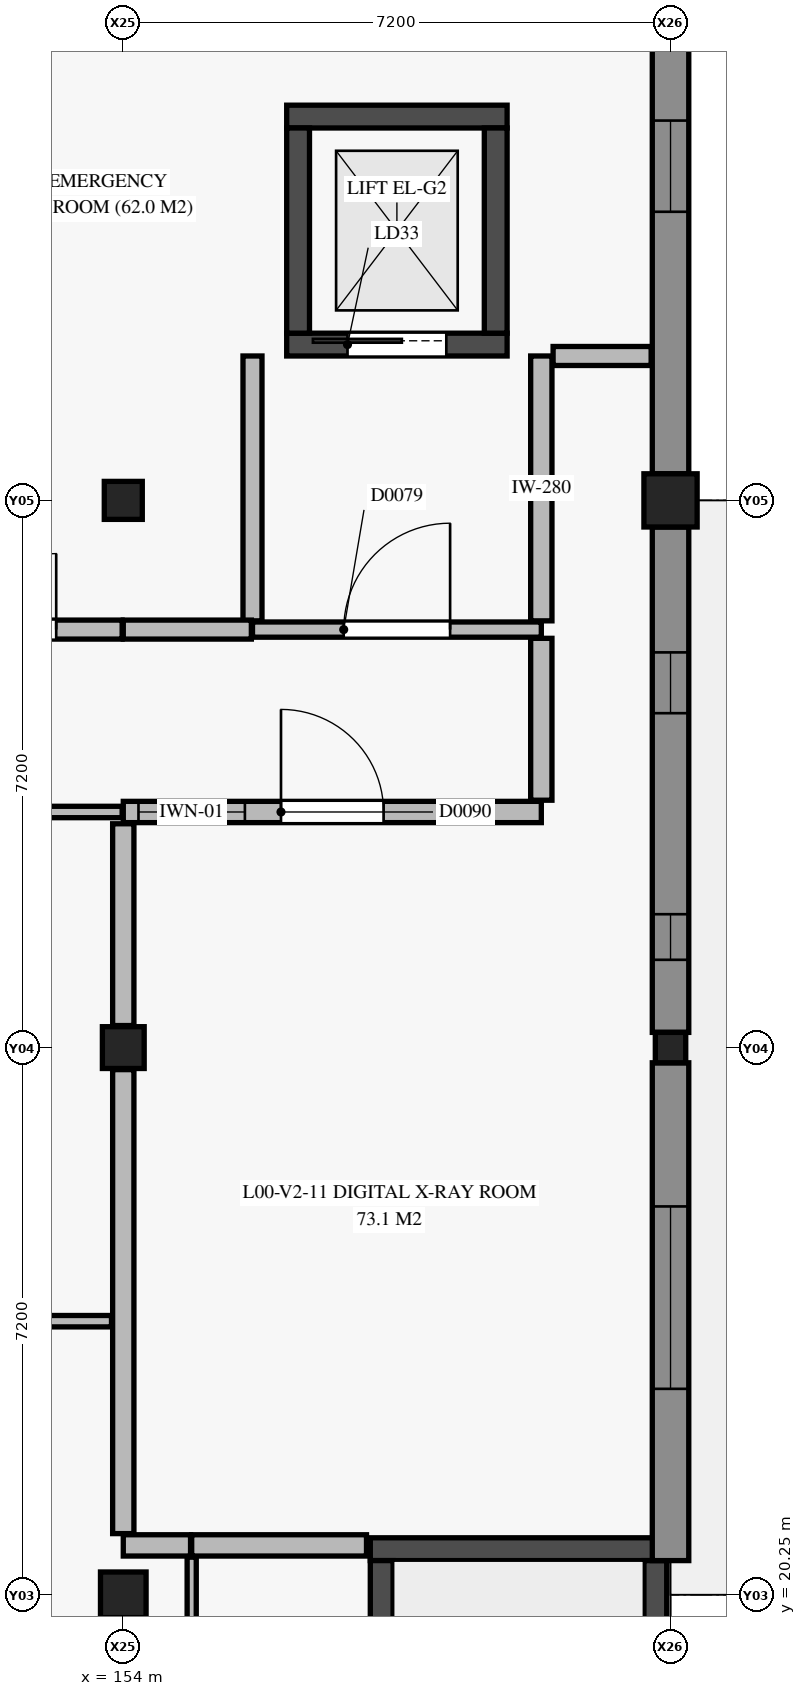
"""IFC4 building model, lengths in metres.
Left out: names, types, materials, properties, quantities, classifications, styles, units other than length and angle.
Written with IfcOpenShell. Run it as: python <this file> out.ifc"""

import sys

from ifc_helpers import new_model, si_unit, direction, frame, frame_2d, origin, origin_2d, place, context, subcontext, project, spatial, rectangle, circle, extrude, element, fill, save


model = new_model("IFC4")
c1 = context("Model", 3, precision=1e-05, world=origin(), true_north=direction((0.0, 1.0)))
c2 = subcontext(c1, "Body", "Model", "MODEL_VIEW")
j1 = project(units=[si_unit("LENGTHUNIT", "METRE"), si_unit("PLANEANGLEUNIT", "RADIAN")], contexts=[c1])
p1 = place(None, origin())
s1 = spatial("IfcSite", under=j1, at=p1, CompositionType="ELEMENT")
p2 = place(p1, origin())
s2 = spatial("IfcBuilding", under=s1, at=p2, CompositionType="ELEMENT")
p3 = place(p2, origin())
s3 = spatial("IfcBuildingStorey", under=s2, at=p3, CompositionType="ELEMENT", Elevation=0.0)
p4 = place(p3, frame((154.0, 20.25, 0.0), z_axis=(0.0, 0.0, 1.0), x_axis=(1.0, 0.0, 0.0)))
e1 = element("IfcColumn", 1, at=p4, inside=s3, PredefinedType="COLUMN", context=c2, shape_type="SweptSolid", body=[
    extrude(rectangle(XDim=0.6, YDim=0.6, at=origin_2d()), origin(), (0.0, 0.0, 1.0), 4.8),
])
p5 = place(p3, frame((154.0, 27.45, 0.0), z_axis=(0.0, 0.0, 1.0), x_axis=(1.0, 0.0, 0.0)))
e2 = element("IfcColumn", 2, at=p5, inside=s3, PredefinedType="COLUMN", context=c2, shape_type="SweptSolid", body=[
    extrude(rectangle(XDim=0.55, YDim=0.55, at=origin_2d()), origin(), (0.0, 0.0, 1.0), 4.8),
])
p6 = place(p3, frame((154.0, 34.65, 0.0), z_axis=(0.0, 0.0, 1.0), x_axis=(1.0, 0.0, 0.0)))
e3 = element("IfcColumn", 3, at=p6, inside=s3, PredefinedType="COLUMN", context=c2, shape_type="SweptSolid", body=[
    extrude(rectangle(XDim=0.5, YDim=0.5, at=origin_2d()), origin(), (0.0, 0.0, 1.0), 4.8),
])
p7 = place(p3, frame((161.2, 27.45, 0.0), z_axis=(0.0, 0.0, 1.0), x_axis=(1.0, 0.0, 0.0)))
e4 = element("IfcColumn", 4, at=p7, inside=s3, PredefinedType="COLUMN", context=c2, shape_type="SweptSolid", body=[
    extrude(rectangle(XDim=0.4, YDim=0.4, at=origin_2d()), origin(), (0.0, 0.0, 1.0), 4.8),
])
p8 = place(p3, frame((161.2, 34.65, 0.0), z_axis=(0.0, 0.0, 1.0), x_axis=(1.0, 0.0, 0.0)))
e5 = element("IfcColumn", 5, at=p8, inside=s3, PredefinedType="COLUMN", context=c2, shape_type="SweptSolid", body=[
    extrude(circle(Radius=0.35, at=origin_2d()), origin(), (0.0, 0.0, 1.0), 4.8),
])
p9 = place(p3, frame((157.25, 20.85, 0.0), z_axis=(0.0, 0.0, 1.0), x_axis=(1.0, 0.0, 0.0)))
e6 = element("IfcWall", 6, at=p9, inside=s3, PredefinedType="SHEAR", context=c2, shape_type="SweptSolid", body=[
    extrude(rectangle(XDim=3.9, YDim=0.3, at=frame_2d((1.95, 0.0))), origin(), (0.0, 0.0, 1.0), 4.46),
])
p10 = place(p3, frame((157.4, 13.4, 0.0), z_axis=(0.0, 0.0, 1.0), x_axis=(0.0, 1.0, 0.0)))
e7 = element("IfcWall", 7, at=p10, inside=s3, PredefinedType="SHEAR", context=c2, shape_type="SweptSolid", body=[
    extrude(rectangle(XDim=7.3, YDim=0.3, at=frame_2d((3.65, 0.0))), origin(), (0.0, 0.0, 1.0), 4.46),
])
p11 = place(p10, frame((0.12, 0.0, 0.0)))
e8 = element("IfcOpeningElement", 8, at=p11, cuts=e7, PredefinedType="OPENING", context=c2, shape_type="SweptSolid", body=[
    extrude(rectangle(XDim=1.5, YDim=2.15, at=frame_2d((0.75, 1.075))), frame((0.0, 0.16, 0.0), z_axis=(0.0, -1.0, 0.0), x_axis=(1.0, 0.0, 0.0)), (0.0, 0.0, 1.0), 0.32),
])
p12 = place(p3, frame((161.0, 13.45, 0.0), z_axis=(0.0, 0.0, 1.0), x_axis=(0.0, 1.0, 0.0)))
e9 = element("IfcWall", 9, at=p12, inside=s3, PredefinedType="SHEAR", context=c2, shape_type="SweptSolid", body=[
    extrude(rectangle(XDim=7.25, YDim=0.3, at=frame_2d((3.625, 0.0))), origin(), (0.0, 0.0, 1.0), 4.46),
])
p13 = place(p3, frame((156.15, 36.7, 0.0), z_axis=(0.0, 0.0, 1.0), x_axis=(1.0, 0.0, 0.0)))
e10 = element("IfcWall", 10, at=p13, inside=s3, PredefinedType="SHEAR", context=c2, shape_type="SweptSolid", body=[
    extrude(rectangle(XDim=2.9, YDim=0.3, at=frame_2d((1.45, 0.0))), origin(), (0.0, 0.0, 1.0), 4.46),
])
p14 = place(p13, frame((0.8, 0.0, 0.0)))
e11 = element("IfcOpeningElement", 11, at=p14, cuts=e10, PredefinedType="OPENING", context=c2, shape_type="SweptSolid", body=[
    extrude(rectangle(XDim=1.3, YDim=2.15, at=frame_2d((0.65, 1.075))), frame((0.0, 0.16, 0.0), z_axis=(0.0, -1.0, 0.0), x_axis=(1.0, 0.0, 0.0)), (0.0, 0.0, 1.0), 0.32),
])
p15 = place(p3, frame((156.15, 39.7, 0.0), z_axis=(0.0, 0.0, 1.0), x_axis=(1.0, 0.0, 0.0)))
e12 = element("IfcWall", 12, at=p15, inside=s3, PredefinedType="SHEAR", context=c2, shape_type="SweptSolid", body=[
    extrude(rectangle(XDim=2.9, YDim=0.3, at=frame_2d((1.45, 0.0))), origin(), (0.0, 0.0, 1.0), 4.46),
])
for number, where, z_axis, x_axis in (
    (13, (156.3, 36.85, 0.0), (0.0, 0.0, 1.0), (0.0, 1.0, 0.0)),
    (14, (158.9, 36.85, 0.0), (0.0, 0.0, 1.0), (0.0, 1.0, 0.0)),
):
    element("IfcWall", number, at=place(p3, frame(where, z_axis=z_axis, x_axis=x_axis)), inside=s3, PredefinedType="SHEAR", context=c2, shape_type="SweptSolid", body=[
        extrude(rectangle(XDim=2.7, YDim=0.3, at=frame_2d((1.35, 0.0))), origin(), (0.0, 0.0, 1.0), 4.46),
    ])
p16 = place(p3, frame((161.2, 41.525, 0.0), z_axis=(0.0, 0.0, 1.0), x_axis=(0.0, -1.0, 0.0)))
e15 = element("IfcWall", 15, at=p16, inside=s3, PredefinedType="SOLIDWALL", context=c2, shape_type="SweptSolid", body=[
    extrude(rectangle(XDim=6.525, YDim=0.48, at=frame_2d((3.262, 0.0))), origin(), (0.0, 0.0, 1.0), 3.64),
])
p17 = place(p16, frame((1.877, 0.0, 0.6)))
e16 = element("IfcOpeningElement", 16, at=p17, cuts=e15, PredefinedType="OPENING", context=c2, shape_type="SweptSolid", body=[
    extrude(rectangle(XDim=1.2, YDim=2.2, at=frame_2d((0.6, 1.1))), frame((0.0, 0.25, 0.0), z_axis=(0.0, -1.0, 0.0), x_axis=(1.0, 0.0, 0.0)), (0.0, 0.0, 1.0), 0.5),
])
p18 = place(p3, frame((161.2, 34.3, 0.0), z_axis=(0.0, 0.0, 1.0), x_axis=(0.0, -1.0, 0.0)))
e17 = element("IfcWall", 17, at=p18, inside=s3, PredefinedType="SOLIDWALL", context=c2, shape_type="SweptSolid", body=[
    extrude(rectangle(XDim=6.65, YDim=0.48, at=frame_2d((3.325, 0.0))), origin(), (0.0, 0.0, 1.0), 3.64),
])
p19 = place(p18, frame((1.65, 0.0, 0.6)))
e18 = element("IfcOpeningElement", 18, at=p19, cuts=e17, PredefinedType="OPENING", context=c2, shape_type="SweptSolid", body=[
    extrude(rectangle(XDim=0.8, YDim=2.6, at=frame_2d((0.4, 1.3))), frame((0.0, 0.25, 0.0), z_axis=(0.0, -1.0, 0.0), x_axis=(1.0, 0.0, 0.0)), (0.0, 0.0, 1.0), 0.5),
])
p20 = place(p18, frame((5.095, 0.0, 0.9)))
e19 = element("IfcOpeningElement", 19, at=p20, cuts=e17, PredefinedType="OPENING", context=c2, shape_type="SweptSolid", body=[
    extrude(rectangle(XDim=0.6, YDim=1.8, at=frame_2d((0.3, 0.9))), frame((0.0, 0.25, 0.0), z_axis=(0.0, -1.0, 0.0), x_axis=(1.0, 0.0, 0.0)), (0.0, 0.0, 1.0), 0.5),
])
p21 = place(p3, frame((161.2, 27.25, 0.0), z_axis=(0.0, 0.0, 1.0), x_axis=(0.0, -1.0, 0.0)))
e20 = element("IfcWall", 20, at=p21, inside=s3, PredefinedType="SOLIDWALL", context=c2, shape_type="SweptSolid", body=[
    extrude(rectangle(XDim=6.55, YDim=0.48, at=frame_2d((3.275, 0.0))), origin(), (0.0, 0.0, 1.0), 3.64),
])
p22 = place(p21, frame((1.89, 0.0, 0.6)))
e21 = element("IfcOpeningElement", 21, at=p22, cuts=e20, PredefinedType="OPENING", context=c2, shape_type="SweptSolid", body=[
    extrude(rectangle(XDim=2.4, YDim=2.2, at=frame_2d((1.2, 1.1))), frame((0.0, 0.25, 0.0), z_axis=(0.0, -1.0, 0.0), x_axis=(1.0, 0.0, 0.0)), (0.0, 0.0, 1.0), 0.5),
])
p23 = place(p3, frame((155.7, 32.95, 0.0), z_axis=(0.0, 0.0, 1.0), x_axis=(1.0, 0.0, 0.0)))
e22 = element("IfcWall", 22, at=p23, inside=s3, PredefinedType="PARTITIONING", context=c2, shape_type="SweptSolid", body=[
    extrude(rectangle(XDim=3.8, YDim=0.2, at=frame_2d((1.9, 0.0))), origin(), (0.0, 0.0, 1.0), 4.46),
])
p24 = place(p23, frame((1.2, 0.0, 0.0)))
e23 = element("IfcOpeningElement", 23, at=p24, cuts=e22, PredefinedType="OPENING", context=c2, shape_type="SweptSolid", body=[
    extrude(rectangle(XDim=1.4, YDim=2.2, at=frame_2d((0.7, 1.1))), frame((0.0, 0.11, 0.0), z_axis=(0.0, -1.0, 0.0), x_axis=(1.0, 0.0, 0.0)), (0.0, 0.0, 1.0), 0.22),
])
p25 = place(p3, frame((155.7, 33.065, 0.0), z_axis=(0.0, 0.0, 1.0), x_axis=(0.0, 1.0, 0.0)))
e24 = element("IfcWall", 24, at=p25, inside=s3, PredefinedType="PARTITIONING", context=c2, shape_type="SweptSolid", body=[
    extrude(rectangle(XDim=3.485, YDim=0.25, at=frame_2d((1.743, 0.0))), origin(), (0.0, 0.0, 1.0), 3.965),
])
p26 = place(p3, frame((159.5, 33.065, 0.0), z_axis=(0.0, 0.0, 1.0), x_axis=(0.0, 1.0, 0.0)))
e25 = element("IfcWall", 25, at=p26, inside=s3, PredefinedType="PARTITIONING", context=c2, shape_type="SweptSolid", body=[
    extrude(rectangle(XDim=3.485, YDim=0.28, at=frame_2d((1.743, 0.0))), origin(), (0.0, 0.0, 1.0), 3.965),
])
p27 = place(p3, frame((154.0, 32.95, 0.0), z_axis=(0.0, 0.0, 1.0), x_axis=(1.0, 0.0, 0.0)))
e26 = element("IfcWall", 26, at=p27, inside=s3, PredefinedType="PARTITIONING", context=c2, shape_type="SweptSolid", body=[
    extrude(rectangle(XDim=1.685, YDim=0.25, at=frame_2d((0.843, 0.0))), origin(), (0.0, 0.0, 1.0), 3.795),
])
p28 = place(p3, frame((150.25, 32.95, 0.0), z_axis=(0.0, 0.0, 1.0), x_axis=(1.0, 0.0, 0.0)))
e27 = element("IfcWall", 27, at=p28, inside=s3, PredefinedType="PARTITIONING", context=c2, shape_type="SweptSolid", body=[
    extrude(rectangle(XDim=3.735, YDim=0.25, at=frame_2d((1.868, 0.0))), origin(), (0.0, 0.0, 1.0), 3.795),
])
p29 = place(p28, frame((0.867, 0.0, 0.0)))
e28 = element("IfcOpeningElement", 28, at=p29, cuts=e27, PredefinedType="OPENING", context=c2, shape_type="SweptSolid", body=[
    extrude(rectangle(XDim=2.0, YDim=2.4, at=frame_2d((1.0, 1.2))), frame((0.0, 0.135, 0.0), z_axis=(0.0, -1.0, 0.0), x_axis=(1.0, 0.0, 0.0)), (0.0, 0.0, 1.0), 0.27),
])
p30 = place(p3, frame((154.9, 20.9, 0.0), z_axis=(0.0, 0.0, 1.0), x_axis=(1.0, 0.0, 0.0)))
e29 = element("IfcWall", 29, at=p30, inside=s3, PredefinedType="PARTITIONING", context=c2, shape_type="SweptSolid", body=[
    extrude(rectangle(XDim=2.3, YDim=0.28, at=frame_2d((1.15, 0.0))), origin(), (0.0, 0.0, 1.0), 4.46),
])
p31 = place(p3, frame((154.0, 30.55, 0.0), z_axis=(0.0, 0.0, 1.0), x_axis=(1.0, 0.0, 0.0)))
e30 = element("IfcWall", 30, at=p31, inside=s3, PredefinedType="PARTITIONING", context=c2, shape_type="SweptSolid", body=[
    extrude(rectangle(XDim=5.5, YDim=0.28, at=frame_2d((2.75, 0.0))), origin(), (0.0, 0.0, 1.0), 3.795),
])
p32 = place(p31, frame((2.075, 0.0, 0.0)))
e31 = element("IfcOpeningElement", 31, at=p32, cuts=e30, PredefinedType="OPENING", context=c2, shape_type="SweptSolid", body=[
    extrude(rectangle(XDim=1.35, YDim=2.2, at=frame_2d((0.675, 1.1))), frame((0.0, 0.15, 0.0), z_axis=(0.0, -1.0, 0.0), x_axis=(1.0, 0.0, 0.0)), (0.0, 0.0, 1.0), 0.3),
])
p33 = place(p31, frame((0.2, 0.0, 1.05)))
e32 = element("IfcOpeningElement", 32, at=p33, cuts=e30, PredefinedType="OPENING", context=c2, shape_type="SweptSolid", body=[
    extrude(rectangle(XDim=1.4, YDim=1.1, at=frame_2d((0.7, 0.55))), frame((0.0, 0.15, 0.0), z_axis=(0.0, -1.0, 0.0), x_axis=(1.0, 0.0, 0.0)), (0.0, 0.0, 1.0), 0.3),
])
p34 = place(p3, frame((159.5, 30.705, 0.0), z_axis=(0.0, 0.0, 1.0), x_axis=(0.0, 1.0, 0.0)))
e33 = element("IfcWall", 33, at=p34, inside=s3, PredefinedType="PARTITIONING", context=c2, shape_type="SweptSolid", body=[
    extrude(rectangle(XDim=2.13, YDim=0.28, at=frame_2d((1.065, 0.0))), origin(), (0.0, 0.0, 1.0), 3.985),
])
p35 = place(p3, frame((151.69, 30.55, 0.0), z_axis=(0.0, 0.0, 1.0), x_axis=(1.0, 0.0, 0.0)))
e34 = element("IfcWall", 34, at=p35, inside=s3, PredefinedType="PARTITIONING", context=c2, shape_type="SweptSolid", body=[
    extrude(rectangle(XDim=2.295, YDim=0.15, at=frame_2d((1.147, 0.0))), origin(), (0.0, 0.0, 1.0), 3.795),
])
p36 = place(p3, frame((154.9, 17.85, 0.0), z_axis=(0.0, 0.0, 1.0), x_axis=(0.0, 1.0, 0.0)))
e35 = element("IfcWall", 35, at=p36, inside=s3, PredefinedType="PARTITIONING", context=c2, shape_type="SweptSolid", body=[
    extrude(rectangle(XDim=2.895, YDim=0.12, at=frame_2d((1.448, 0.0))), origin(), (0.0, 0.0, 1.0), 4.46),
])
p37 = place(p3, frame((159.655, 36.55, 0.0), z_axis=(0.0, 0.0, 1.0), x_axis=(1.0, 0.0, 0.0)))
e36 = element("IfcWall", 36, at=p37, inside=s3, PredefinedType="PARTITIONING", context=c2, shape_type="SweptSolid", body=[
    extrude(rectangle(XDim=1.29, YDim=0.25, at=frame_2d((0.645, 0.0))), origin(), (0.0, 0.0, 1.0), 4.46),
])
p38 = place(p3, frame((154.0, 20.9, 0.0), z_axis=(0.0, 0.0, 1.0), x_axis=(1.0, 0.0, 0.0)))
e37 = element("IfcWall", 37, at=p38, inside=s3, PredefinedType="PARTITIONING", context=c2, shape_type="SweptSolid", body=[
    extrude(rectangle(XDim=0.885, YDim=0.28, at=frame_2d((0.442, 0.0))), origin(), (0.0, 0.0, 1.0), 3.725),
])
p39 = place(p3, frame((154.0, 21.055, 0.0), z_axis=(0.0, 0.0, 1.0), x_axis=(0.0, 1.0, 0.0)))
e38 = element("IfcWall", 38, at=p39, inside=s3, PredefinedType="PARTITIONING", context=c2, shape_type="SweptSolid", body=[
    extrude(rectangle(XDim=6.105, YDim=0.28, at=frame_2d((3.052, 0.0))), origin(), (0.0, 0.0, 1.0), 3.725),
])
p40 = place(p3, frame((154.0, 27.74, 0.0), z_axis=(0.0, 0.0, 1.0), x_axis=(0.0, 1.0, 0.0)))
e39 = element("IfcWall", 39, at=p40, inside=s3, PredefinedType="PARTITIONING", context=c2, shape_type="SweptSolid", body=[
    extrude(rectangle(XDim=2.655, YDim=0.28, at=frame_2d((1.328, 0.0))), origin(), (0.0, 0.0, 1.0), 3.795),
])
p41 = place(p3, frame((151.69, 23.85, 0.0), z_axis=(0.0, 0.0, 1.0), x_axis=(1.0, 0.0, 0.0)))
e40 = element("IfcWall", 40, at=p41, inside=s3, PredefinedType="PARTITIONING", context=c2, shape_type="SweptSolid", body=[
    extrude(rectangle(XDim=2.155, YDim=0.15, at=frame_2d((1.078, 0.0))), origin(), (0.0, 0.0, 1.0), 4.46),
])
p42 = place(p17, origin())
e41 = element("IfcWindow", 41, at=p42, inside=s3, PartitioningType="SINGLE_PANEL", PredefinedType="WINDOW", context=c2, shape_type="SweptSolid", body=[
    extrude(rectangle(XDim=1.2, YDim=2.2, at=frame_2d((0.6, 1.1))), frame((0.0, 0.03, 0.0), z_axis=(0.0, -1.0, 0.0), x_axis=(1.0, 0.0, 0.0)), (0.0, 0.0, 1.0), 0.06),
])
fill(e16, e41)
p43 = place(p19, origin())
e42 = element("IfcWindow", 42, at=p43, inside=s3, PartitioningType="SINGLE_PANEL", PredefinedType="WINDOW", context=c2, shape_type="SweptSolid", body=[
    extrude(rectangle(XDim=0.8, YDim=2.6, at=frame_2d((0.4, 1.3))), frame((0.0, 0.03, 0.0), z_axis=(0.0, -1.0, 0.0), x_axis=(1.0, 0.0, 0.0)), (0.0, 0.0, 1.0), 0.06),
])
fill(e18, e42)
p44 = place(p20, origin())
e43 = element("IfcWindow", 43, at=p44, inside=s3, PartitioningType="SINGLE_PANEL", PredefinedType="WINDOW", context=c2, shape_type="SweptSolid", body=[
    extrude(rectangle(XDim=0.6, YDim=1.8, at=frame_2d((0.3, 0.9))), frame((0.0, 0.03, 0.0), z_axis=(0.0, -1.0, 0.0), x_axis=(1.0, 0.0, 0.0)), (0.0, 0.0, 1.0), 0.06),
])
fill(e19, e43)
p45 = place(p22, origin())
e44 = element("IfcWindow", 44, at=p45, inside=s3, PartitioningType="SINGLE_PANEL", PredefinedType="WINDOW", context=c2, shape_type="SweptSolid", body=[
    extrude(rectangle(XDim=2.4, YDim=2.2, at=frame_2d((1.2, 1.1))), frame((0.0, 0.03, 0.0), z_axis=(0.0, -1.0, 0.0), x_axis=(1.0, 0.0, 0.0)), (0.0, 0.0, 1.0), 0.06),
])
fill(e21, e44)
p46 = place(p14, origin())
e45 = element("IfcDoor", 45, at=p46, inside=s3, OperationType="SLIDING_TO_LEFT", PredefinedType="DOOR", context=c2, shape_type="SweptSolid", body=[
    extrude(rectangle(XDim=1.3, YDim=2.15, at=frame_2d((0.65, 1.075))), frame((0.0, 0.025, 0.0), z_axis=(0.0, -1.0, 0.0), x_axis=(1.0, 0.0, 0.0)), (0.0, 0.0, 1.0), 0.05),
])
fill(e11, e45)
p47 = place(p24, origin())
e46 = element("IfcDoor", 46, at=p47, inside=s3, OperationType="SINGLE_SWING_RIGHT", PredefinedType="DOOR", context=c2, shape_type="SweptSolid", body=[
    extrude(rectangle(XDim=1.4, YDim=2.2, at=frame_2d((0.7, 1.1))), frame((0.0, 0.025, 0.0), z_axis=(0.0, -1.0, 0.0), x_axis=(1.0, 0.0, 0.0)), (0.0, 0.0, 1.0), 0.05),
])
fill(e23, e46)
p48 = place(p32, origin())
e47 = element("IfcDoor", 47, at=p48, inside=s3, OperationType="SINGLE_SWING_LEFT", PredefinedType="DOOR", context=c2, shape_type="SweptSolid", body=[
    extrude(rectangle(XDim=1.35, YDim=2.2, at=frame_2d((0.675, 1.1))), frame((0.0, 0.025, 0.0), z_axis=(0.0, -1.0, 0.0), x_axis=(1.0, 0.0, 0.0)), (0.0, 0.0, 1.0), 0.05),
])
fill(e31, e47)
p49 = place(p33, origin())
e48 = element("IfcWindow", 48, at=p49, inside=s3, PartitioningType="SINGLE_PANEL", PredefinedType="WINDOW", context=c2, shape_type="SweptSolid", body=[
    extrude(rectangle(XDim=1.4, YDim=1.1, at=frame_2d((0.7, 0.55))), frame((0.0, 0.03, 0.0), z_axis=(0.0, -1.0, 0.0), x_axis=(1.0, 0.0, 0.0)), (0.0, 0.0, 1.0), 0.06),
])
fill(e32, e48)
p50 = place(p29, origin())
e49 = element("IfcDoor", 49, at=p50, inside=s3, OperationType="DOUBLE_DOOR_SINGLE_SWING", PredefinedType="DOOR", context=c2, shape_type="SweptSolid", body=[
    extrude(rectangle(XDim=2.0, YDim=2.4, at=frame_2d((1.0, 1.2))), frame((0.0, 0.025, 0.0), z_axis=(0.0, -1.0, 0.0), x_axis=(1.0, 0.0, 0.0)), (0.0, 0.0, 1.0), 0.05),
])
fill(e28, e49)
save(model, sys.argv[1])
